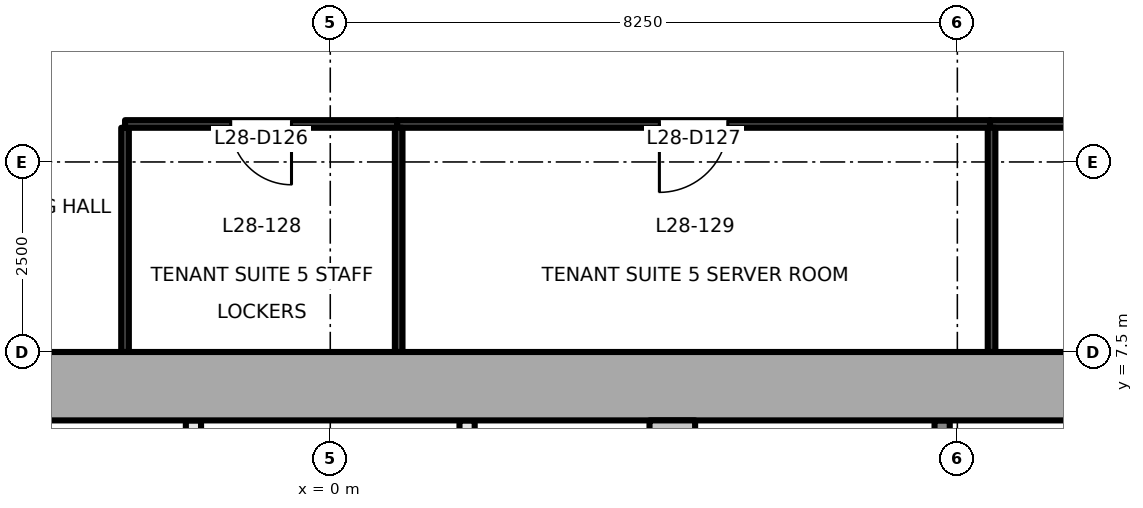
"""IFC4 building model, lengths in metres.
Left out: names, types, materials, properties, quantities, classifications, styles, units other than length and angle.
Written with IfcOpenShell. Run it as: python <this file> out.ifc"""

import sys

from ifc_helpers import new_model, si_unit, direction, frame, frame_2d, origin, place, context, subcontext, project, spatial, rectangle, extrude, element, fill, save


model = new_model("IFC4")
c1 = context("Model", 3, precision=1e-05, world=origin(), true_north=direction((0.0, 1.0)))
c2 = subcontext(c1, "Body", "Model", "MODEL_VIEW")
j1 = project(units=[si_unit("LENGTHUNIT", "METRE"), si_unit("PLANEANGLEUNIT", "RADIAN")], contexts=[c1])
p1 = place(None, origin())
s1 = spatial("IfcSite", under=j1, at=p1, CompositionType="ELEMENT")
p2 = place(p1, origin())
s2 = spatial("IfcBuilding", under=s1, at=p2, CompositionType="ELEMENT")
p3 = place(p2, frame((0.0, 0.0, 126.1)))
s3 = spatial("IfcBuildingStorey", under=s2, at=p3, CompositionType="ELEMENT", Elevation=126.1)
p4 = place(p3, frame((-18.0, 7.05, -0.2), z_axis=(0.0, 0.0, 1.0), x_axis=(1.0, 0.0, 0.0)))
e1 = element("IfcWall", 1, at=p4, inside=s3, PredefinedType="SHEAR", context=c2, shape_type="SweptSolid", body=[
    extrude(rectangle(XDim=36.0, YDim=0.9, at=frame_2d((18.0, 0.0))), origin(), (0.0, 0.0, 1.0), 4.0),
])
p5 = place(p3, frame((4.5, -6.6, -0.2), z_axis=(0.0, 0.0, 1.0), x_axis=(0.0, 1.0, 0.0)))
e2 = element("IfcWall", 2, at=p5, inside=s3, PredefinedType="SHEAR", context=c2, shape_type="SweptSolid", body=[
    extrude(rectangle(XDim=13.2, YDim=0.6, at=frame_2d((6.6, 0.0))), origin(), (0.0, 0.0, 1.0), 4.0),
])
p6 = place(p3, frame((-1.8, -6.6, 0.0), z_axis=(0.0, 0.0, 1.0), x_axis=(0.0, 1.0, 0.0)))
e3 = element("IfcWall", 3, at=p6, inside=s3, PredefinedType="PARTITIONING", context=c2, shape_type="SweptSolid", body=[
    extrude(rectangle(XDim=13.2, YDim=0.2, at=frame_2d((6.6, 0.0))), origin(), (0.0, 0.0, 1.0), 3.8),
])
p7 = place(p6, frame((0.55, 0.0, 0.0)))
e4 = element("IfcOpeningElement", 4, at=p7, cuts=e3, PredefinedType="OPENING", context=c2, shape_type="SweptSolid", body=[
    extrude(rectangle(XDim=0.9, YDim=2.1, at=frame_2d((0.45, 1.05))), frame((0.0, 0.111, 0.0), z_axis=(0.0, -1.0, 0.0), x_axis=(1.0, 0.0, 0.0)), (0.0, 0.0, 1.0), 0.221),
])
p8 = place(p3, frame((1.8, -6.6, 0.0), z_axis=(0.0, 0.0, 1.0), x_axis=(0.0, 1.0, 0.0)))
e5 = element("IfcWall", 5, at=p8, inside=s3, PredefinedType="PARTITIONING", context=c2, shape_type="SweptSolid", body=[
    extrude(rectangle(XDim=13.2, YDim=0.2, at=frame_2d((6.6, 0.0))), origin(), (0.0, 0.0, 1.0), 3.8),
])
p9 = place(p8, frame((0.55, 0.0, 0.0)))
e6 = element("IfcOpeningElement", 6, at=p9, cuts=e5, PredefinedType="OPENING", context=c2, shape_type="SweptSolid", body=[
    extrude(rectangle(XDim=0.9, YDim=2.1, at=frame_2d((0.45, 1.05))), frame((0.0, 0.111, 0.0), z_axis=(0.0, -1.0, 0.0), x_axis=(1.0, 0.0, 0.0)), (0.0, 0.0, 1.0), 0.221),
])
p10 = place(p3, frame((8.05, -6.6, 0.0), z_axis=(0.0, 0.0, 1.0), x_axis=(0.0, 1.0, 0.0)))
e7 = element("IfcWall", 7, at=p10, inside=s3, PredefinedType="PARTITIONING", context=c2, shape_type="SweptSolid", body=[
    extrude(rectangle(XDim=13.2, YDim=0.2, at=frame_2d((6.6, 0.0))), origin(), (0.0, 0.0, 1.0), 3.8),
])
p11 = place(p10, frame((0.298, 0.0, 0.0)))
e8 = element("IfcOpeningElement", 8, at=p11, cuts=e7, PredefinedType="OPENING", context=c2, shape_type="SweptSolid", body=[
    extrude(rectangle(XDim=0.9, YDim=2.1, at=frame_2d((0.45, 1.05))), frame((0.0, 0.111, 0.0), z_axis=(0.0, -1.0, 0.0), x_axis=(1.0, 0.0, 0.0)), (0.0, 0.0, 1.0), 0.221),
])
p12 = place(p10, frame((2.066, 0.0, 0.0)))
e9 = element("IfcOpeningElement", 9, at=p12, cuts=e7, PredefinedType="OPENING", context=c2, shape_type="SweptSolid", body=[
    extrude(rectangle(XDim=0.9, YDim=2.1, at=frame_2d((0.45, 1.05))), frame((0.0, 0.111, 0.0), z_axis=(0.0, -1.0, 0.0), x_axis=(1.0, 0.0, 0.0)), (0.0, 0.0, 1.0), 0.221),
])
p13 = place(p10, frame((3.834, 0.0, 0.0)))
e10 = element("IfcOpeningElement", 10, at=p13, cuts=e7, PredefinedType="OPENING", context=c2, shape_type="SweptSolid", body=[
    extrude(rectangle(XDim=0.9, YDim=2.1, at=frame_2d((0.45, 1.05))), frame((0.0, 0.111, 0.0), z_axis=(0.0, -1.0, 0.0), x_axis=(1.0, 0.0, 0.0)), (0.0, 0.0, 1.0), 0.221),
])
p14 = place(p10, frame((5.466, 0.0, 0.0)))
e11 = element("IfcOpeningElement", 11, at=p14, cuts=e7, PredefinedType="OPENING", context=c2, shape_type="SweptSolid", body=[
    extrude(rectangle(XDim=0.9, YDim=2.1, at=frame_2d((0.45, 1.05))), frame((0.0, 0.111, 0.0), z_axis=(0.0, -1.0, 0.0), x_axis=(1.0, 0.0, 0.0)), (0.0, 0.0, 1.0), 0.221),
])
p15 = place(p10, frame((11.9, 0.0, 0.0)))
e12 = element("IfcOpeningElement", 12, at=p15, cuts=e7, PredefinedType="OPENING", context=c2, shape_type="SweptSolid", body=[
    extrude(rectangle(XDim=1.1, YDim=2.1, at=frame_2d((0.55, 1.05))), frame((0.0, 0.111, 0.0), z_axis=(0.0, -1.0, 0.0), x_axis=(1.0, 0.0, 0.0)), (0.0, 0.0, 1.0), 0.221),
])
p16 = place(p3, frame((-2.7, 10.45, 0.0), z_axis=(0.0, 0.0, 1.0), x_axis=(0.0, -1.0, 0.0)))
e13 = element("IfcWall", 13, at=p16, inside=s3, PredefinedType="PARTITIONING", context=c2, shape_type="SweptSolid", body=[
    extrude(rectangle(XDim=2.95, YDim=0.1, at=frame_2d((1.475, 0.0))), origin(), (0.0, 0.0, 1.0), 3.8),
])
p17 = place(p3, frame((0.88, 10.5, 0.0), z_axis=(0.0, 0.0, 1.0), x_axis=(-1.0, 0.0, 0.0)))
e14 = element("IfcWall", 14, at=p17, inside=s3, PredefinedType="PARTITIONING", context=c2, shape_type="SweptSolid", body=[
    extrude(rectangle(XDim=3.58, YDim=0.1, at=frame_2d((1.79, 0.0))), origin(), (0.0, 0.0, 1.0), 3.5),
])
p18 = place(p17, frame((1.39, 0.0, 0.0)))
e15 = element("IfcOpeningElement", 15, at=p18, cuts=e14, PredefinedType="OPENING", context=c2, shape_type="SweptSolid", body=[
    extrude(rectangle(XDim=0.8, YDim=2.1, at=frame_2d((0.4, 1.05))), frame((0.0, 0.061, 0.0), z_axis=(0.0, -1.0, 0.0), x_axis=(1.0, 0.0, 0.0)), (0.0, 0.0, 1.0), 0.121),
])
p19 = place(p3, frame((8.68, 10.5, 0.0), z_axis=(0.0, 0.0, 1.0), x_axis=(-1.0, 0.0, 0.0)))
e16 = element("IfcWall", 16, at=p19, inside=s3, PredefinedType="PARTITIONING", context=c2, shape_type="SweptSolid", body=[
    extrude(rectangle(XDim=7.8, YDim=0.1, at=frame_2d((3.9, 0.0))), origin(), (0.0, 0.0, 1.0), 3.5),
])
p20 = place(p19, frame((3.45, 0.0, 0.0)))
e17 = element("IfcOpeningElement", 17, at=p20, cuts=e16, PredefinedType="OPENING", context=c2, shape_type="SweptSolid", body=[
    extrude(rectangle(XDim=0.9, YDim=2.1, at=frame_2d((0.45, 1.05))), frame((0.0, 0.061, 0.0), z_axis=(0.0, -1.0, 0.0), x_axis=(1.0, 0.0, 0.0)), (0.0, 0.0, 1.0), 0.121),
])
p21 = place(p3, frame((17.7, 10.5, 0.0), z_axis=(0.0, 0.0, 1.0), x_axis=(-1.0, 0.0, 0.0)))
e18 = element("IfcWall", 18, at=p21, inside=s3, PredefinedType="PARTITIONING", context=c2, shape_type="SweptSolid", body=[
    extrude(rectangle(XDim=9.02, YDim=0.1, at=frame_2d((4.51, 0.0))), origin(), (0.0, 0.0, 1.0), 3.5),
])
p22 = place(p21, frame((2.566, 0.0, 0.0)))
e19 = element("IfcOpeningElement", 19, at=p22, cuts=e18, PredefinedType="OPENING", context=c2, shape_type="SweptSolid", body=[
    extrude(rectangle(XDim=0.8, YDim=2.1, at=frame_2d((0.4, 1.05))), frame((0.0, 0.061, 0.0), z_axis=(0.0, -1.0, 0.0), x_axis=(1.0, 0.0, 0.0)), (0.0, 0.0, 1.0), 0.121),
])
for number, where, z_axis, x_axis in (
    (20, (0.9, 10.45, 0.0), (0.0, 0.0, 1.0), (0.0, -1.0, 0.0)),
    (21, (8.7, 10.45, 0.0), (0.0, 0.0, 1.0), (0.0, -1.0, 0.0)),
):
    element("IfcWall", number, at=place(p3, frame(where, z_axis=z_axis, x_axis=x_axis)), inside=s3, PredefinedType="PARTITIONING", context=c2, shape_type="SweptSolid", body=[
        extrude(rectangle(XDim=2.95, YDim=0.1, at=frame_2d((1.475, 0.0))), origin(), (0.0, 0.0, 1.0), 3.8),
    ])
p23 = place(p18, origin())
e22 = element("IfcDoor", 22, at=p23, inside=s3, OperationType="SINGLE_SWING_LEFT", PredefinedType="DOOR", context=c2, shape_type="SweptSolid", body=[
    extrude(rectangle(XDim=0.8, YDim=2.1, at=frame_2d((0.4, 1.05))), frame((0.0, 0.025, 0.0), z_axis=(0.0, -1.0, 0.0), x_axis=(1.0, 0.0, 0.0)), (0.0, 0.0, 1.0), 0.05),
])
fill(e15, e22)
p24 = place(p20, origin())
e23 = element("IfcDoor", 23, at=p24, inside=s3, OperationType="SINGLE_SWING_RIGHT", PredefinedType="DOOR", context=c2, shape_type="SweptSolid", body=[
    extrude(rectangle(XDim=0.9, YDim=2.1, at=frame_2d((0.45, 1.05))), frame((0.0, 0.025, 0.0), z_axis=(0.0, -1.0, 0.0), x_axis=(1.0, 0.0, 0.0)), (0.0, 0.0, 1.0), 0.05),
])
fill(e17, e23)
save(model, sys.argv[1])
